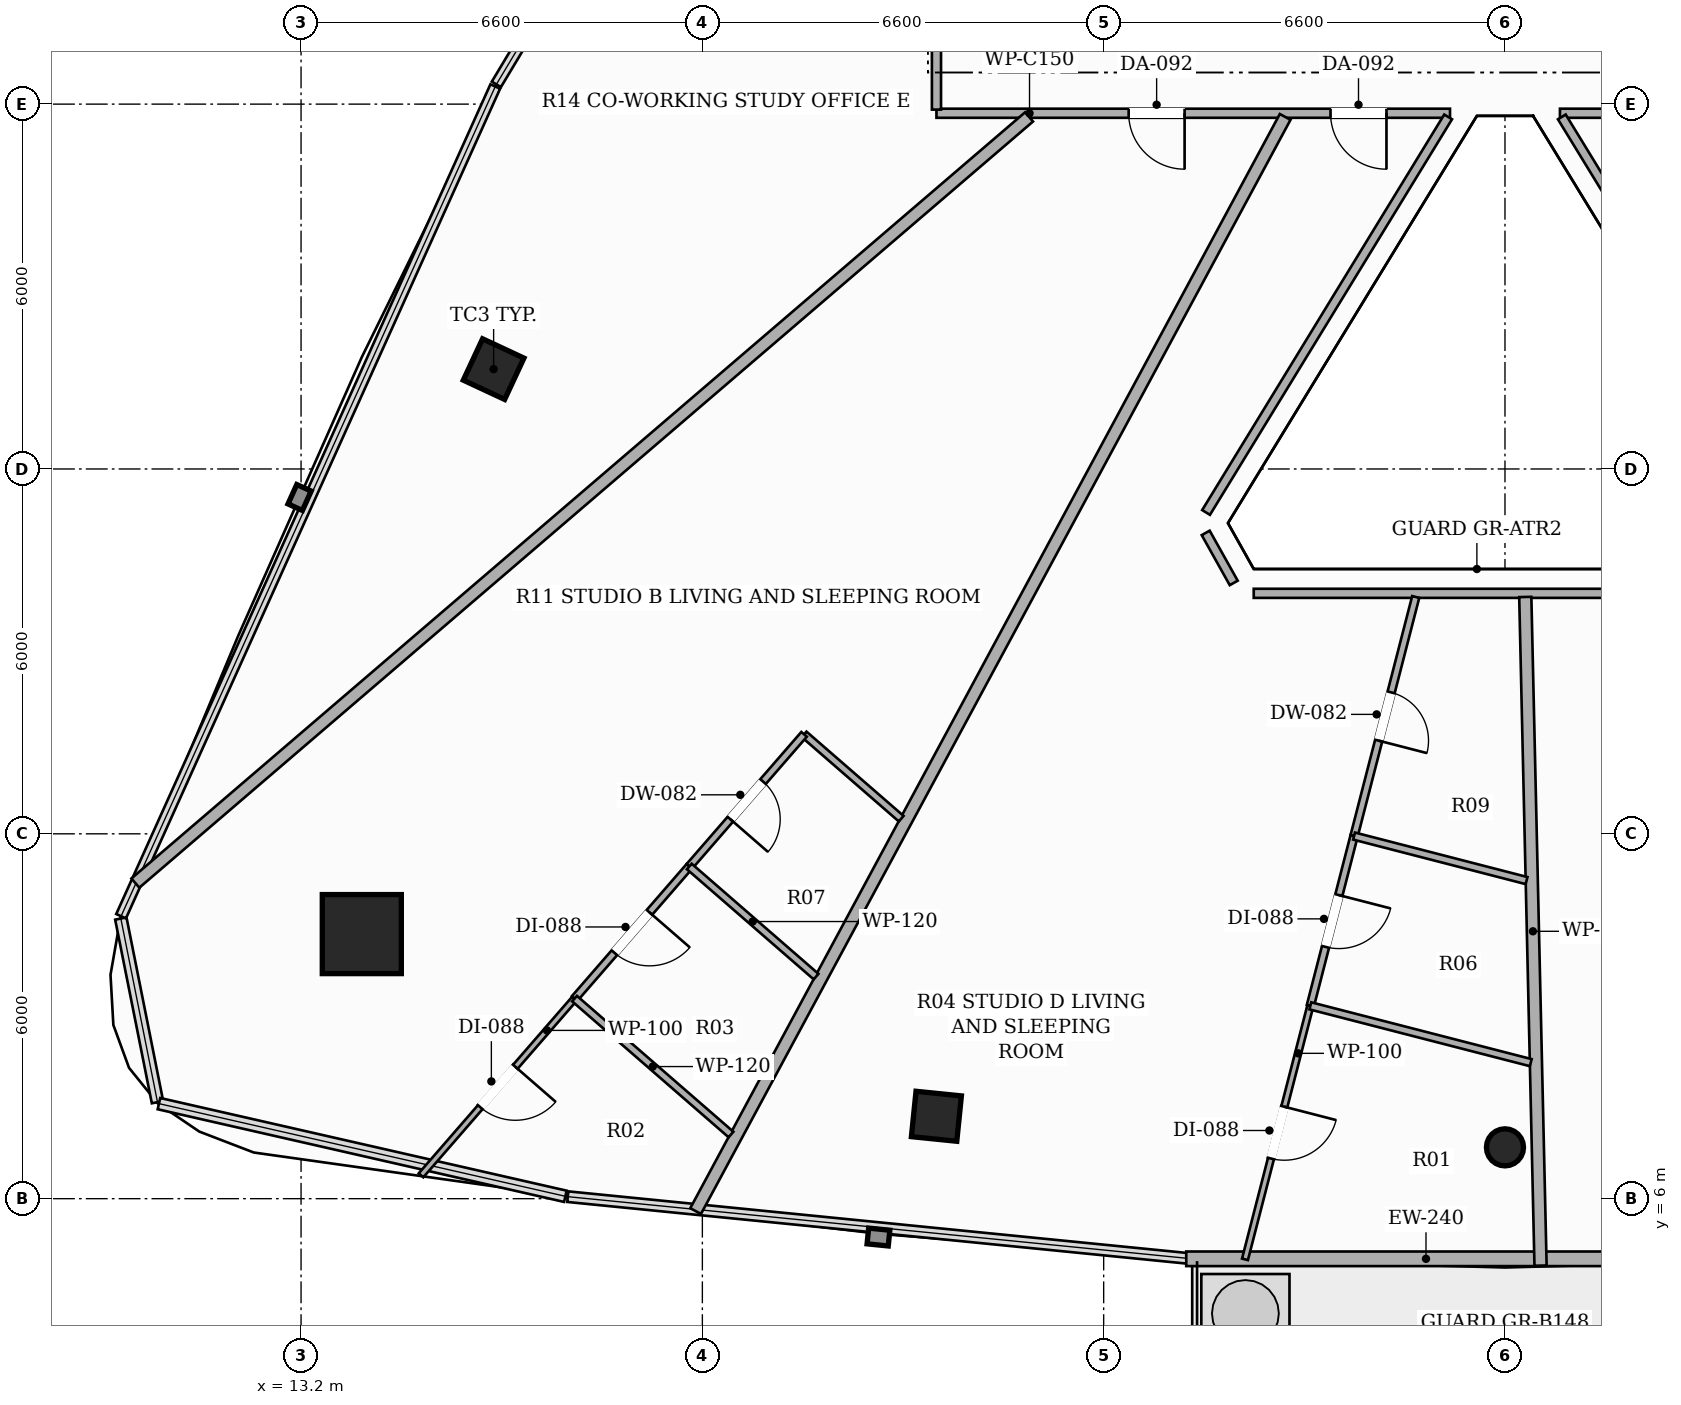
"""IFC4 building model, lengths in metres.
Left out: names, types, materials, properties, quantities, classifications, styles, units other than length and angle.
Written with IfcOpenShell. Run it as: python <this file> out.ifc"""

import sys

from ifc_helpers import new_model, si_unit, direction, frame, frame_2d, origin, origin_2d, place, context, subcontext, project, spatial, rectangle, hollow_rectangle, hollow_circle, extrude, element, fill, save


model = new_model("IFC4")
c1 = context("Model", 3, precision=1e-05, world=origin(), true_north=direction((0.0, 1.0)))
c2 = subcontext(c1, "Body", "Model", "MODEL_VIEW")
j1 = project(units=[si_unit("LENGTHUNIT", "METRE"), si_unit("PLANEANGLEUNIT", "RADIAN")], contexts=[c1])
p1 = place(None, origin())
s1 = spatial("IfcSite", under=j1, at=p1, CompositionType="ELEMENT")
p2 = place(p1, origin())
s2 = spatial("IfcBuilding", under=s1, at=p2, CompositionType="ELEMENT")
p3 = place(p2, frame((0.0, 0.0, 232.7)))
s3 = spatial("IfcBuildingStorey", under=s2, at=p3, CompositionType="ELEMENT", Elevation=232.7)
p4 = place(p3, frame((14.199, 10.351, 0.0), z_axis=(0.0, 0.0, 1.0), x_axis=(1.0, 0.0, 0.0)))
e1 = element("IfcColumn", 1, at=p4, inside=s3, PredefinedType="COLUMN", context=c2, shape_type="SweptSolid", body=[
    extrude(hollow_rectangle(XDim=1.3, YDim=1.3, WallThickness=0.04, at=origin_2d()), origin(), (0.0, 0.0, 1.0), 3.3),
])
for number, where, z_axis, x_axis in (
    (2, (16.367, 19.642, 0.0), (0.0, 0.0, 1.0), (0.423, 0.906, 0.0)),
    (3, (23.649, 7.355, 0.0), (0.0, 0.0, 1.0), (-0.995, 0.101, 0.0)),
):
    element("IfcColumn", number, at=place(p3, frame(where, z_axis=z_axis, x_axis=x_axis)), inside=s3, PredefinedType="COLUMN", context=c2, shape_type="SweptSolid", body=[
        extrude(hollow_rectangle(XDim=0.75, YDim=0.75, WallThickness=0.025, at=origin_2d()), origin(), (0.0, 0.0, 1.0), 3.3),
    ])
p5 = place(p3, frame((33.0, 6.844, 0.0), z_axis=(0.0, 0.0, 1.0), x_axis=(1.0, 0.0, 0.0)))
e4 = element("IfcColumn", 4, at=p5, inside=s3, PredefinedType="COLUMN", context=c2, shape_type="SweptSolid", body=[
    extrude(hollow_circle(Radius=0.305, WallThickness=0.016, at=origin_2d()), origin(), (0.0, 0.0, 1.0), 3.3),
])
p6 = place(p3, frame((27.758, 5.011, 0.0), z_axis=(0.0, 0.0, 1.0), x_axis=(1.0, 0.0, 0.0)))
e5 = element("IfcWall", 5, at=p6, inside=s3, PredefinedType="SOLIDWALL", context=c2, shape_type="SweptSolid", body=[
    extrude(rectangle(XDim=10.484, YDim=0.24, at=frame_2d((5.242, 0.0))), origin(), (0.0, 0.0, 1.0), 2.584),
])
p7 = place(p6, frame((7.986, 0.0, 0.0)))
e6 = element("IfcOpeningElement", 6, at=p7, cuts=e5, PredefinedType="OPENING", context=c2, shape_type="SweptSolid", body=[
    extrude(rectangle(XDim=1.8, YDim=2.2, at=frame_2d((0.9, 1.1))), frame((0.0, 0.13, 0.0), z_axis=(0.0, -1.0, 0.0), x_axis=(1.0, 0.0, 0.0)), (0.0, 0.0, 1.0), 0.26),
])
p8 = place(p3, frame((32.096, 23.85, 0.0), z_axis=(0.0, 0.0, 1.0), x_axis=(-1.0, 0.0, 0.0)))
e7 = element("IfcWall", 7, at=p8, inside=s3, PredefinedType="PARTITIONING", context=c2, shape_type="SweptSolid", body=[
    extrude(rectangle(XDim=8.446, YDim=0.15, at=frame_2d((4.223, 0.0))), origin(), (0.0, 0.0, 1.0), 2.525),
])
p9 = place(p8, frame((4.365, 0.0, 0.0)))
e8 = element("IfcOpeningElement", 8, at=p9, cuts=e7, PredefinedType="OPENING", context=c2, shape_type="SweptSolid", body=[
    extrude(rectangle(XDim=0.92, YDim=2.15, at=frame_2d((0.46, 1.075))), frame((0.0, 0.085, 0.0), z_axis=(0.0, -1.0, 0.0), x_axis=(1.0, 0.0, 0.0)), (0.0, 0.0, 1.0), 0.17),
])
p10 = place(p8, frame((1.045, 0.0, 0.0)))
e9 = element("IfcOpeningElement", 9, at=p10, cuts=e7, PredefinedType="OPENING", context=c2, shape_type="SweptSolid", body=[
    extrude(rectangle(XDim=0.92, YDim=2.15, at=frame_2d((0.46, 1.075))), frame((0.0, 0.085, 0.0), z_axis=(0.0, -1.0, 0.0), x_axis=(1.0, 0.0, 0.0)), (0.0, 0.0, 1.0), 0.17),
])
p11 = place(p3, frame((23.65, 23.91, 0.0), z_axis=(0.0, 0.0, 1.0), x_axis=(0.0, 1.0, 0.0)))
e10 = element("IfcWall", 10, at=p11, inside=s3, PredefinedType="PARTITIONING", context=c2, shape_type="SweptSolid", body=[
    extrude(rectangle(XDim=11.888, YDim=0.15, at=frame_2d((5.944, 0.0))), origin(), (0.0, 0.0, 1.0), 2.452),
])
p12 = place(p11, frame((5.504, 0.0, 0.0)))
e11 = element("IfcOpeningElement", 11, at=p12, cuts=e10, PredefinedType="OPENING", context=c2, shape_type="SweptSolid", body=[
    extrude(rectangle(XDim=0.88, YDim=2.1, at=frame_2d((0.44, 1.05))), frame((0.0, 0.085, 0.0), z_axis=(0.0, -1.0, 0.0), x_axis=(1.0, 0.0, 0.0)), (0.0, 0.0, 1.0), 0.17),
])
p13 = place(p3, frame((42.19, 23.85, 0.0), z_axis=(0.0, 0.0, 1.0), x_axis=(-1.0, 0.0, 0.0)))
e12 = element("IfcWall", 12, at=p13, inside=s3, PredefinedType="PARTITIONING", context=c2, shape_type="SweptSolid", body=[
    extrude(rectangle(XDim=8.286, YDim=0.15, at=frame_2d((4.143, 0.0))), origin(), (0.0, 0.0, 1.0), 2.525),
])
p14 = place(p13, frame((5.824, 0.0, 0.0)))
e13 = element("IfcOpeningElement", 13, at=p14, cuts=e12, PredefinedType="OPENING", context=c2, shape_type="SweptSolid", body=[
    extrude(rectangle(XDim=0.88, YDim=2.1, at=frame_2d((0.44, 1.05))), frame((0.0, 0.085, 0.0), z_axis=(0.0, -1.0, 0.0), x_axis=(1.0, 0.0, 0.0)), (0.0, 0.0, 1.0), 0.17),
])
p15 = place(p13, frame((2.745, 0.0, 0.0)))
e14 = element("IfcOpeningElement", 14, at=p15, cuts=e12, PredefinedType="OPENING", context=c2, shape_type="SweptSolid", body=[
    extrude(rectangle(XDim=0.88, YDim=2.1, at=frame_2d((0.44, 1.05))), frame((0.0, 0.085, 0.0), z_axis=(0.0, -1.0, 0.0), x_axis=(1.0, 0.0, 0.0)), (0.0, 0.0, 1.0), 0.17),
])
p16 = place(p3, frame((33.935, 23.79, 0.0), z_axis=(0.0, 0.0, 1.0), x_axis=(0.521984684225, -0.852954857794, 0.0)))
e15 = element("IfcWall", 15, at=p16, inside=s3, PredefinedType="PARTITIONING", context=c2, shape_type="SweptSolid", body=[
    extrude(rectangle(XDim=7.626, YDim=0.15, at=frame_2d((3.813, 0.0))), origin(), (0.0, 0.0, 1.0), 2.733),
])
p17 = place(p3, frame((37.132, 15.955, 0.0), z_axis=(0.0, 0.0, 1.0), x_axis=(-1.0, 0.0, 0.0)))
e16 = element("IfcWall", 16, at=p17, inside=s3, PredefinedType="PARTITIONING", context=c2, shape_type="SweptSolid", body=[
    extrude(rectangle(XDim=8.264, YDim=0.15, at=frame_2d((4.132, 0.0))), origin(), (0.0, 0.0, 1.0), 2.733),
])
p18 = place(p3, frame((28.539, 16.126, 0.0), z_axis=(0.0, 0.0, 1.0), x_axis=(-0.488847636641, 0.87236918111, 0.0)))
e17 = element("IfcWall", 17, at=p18, inside=s3, PredefinedType="PARTITIONING", context=c2, shape_type="SweptSolid", body=[
    extrude(rectangle(XDim=0.943, YDim=0.15, at=frame_2d((0.472, 0.0))), origin(), (0.0, 0.0, 1.0), 3.02),
])
p19 = place(p3, frame((28.084, 17.285, 0.0), z_axis=(0.0, 0.0, 1.0), x_axis=(0.521984684225, 0.852954857794, 0.0)))
e18 = element("IfcWall", 18, at=p19, inside=s3, PredefinedType="PARTITIONING", context=c2, shape_type="SweptSolid", body=[
    extrude(rectangle(XDim=7.626, YDim=0.15, at=frame_2d((3.813, 0.0))), origin(), (0.0, 0.0, 1.0), 2.733),
])
p20 = place(p3, frame((33.585, 4.899, 0.0), z_axis=(0.0, 0.0, 1.0), x_axis=(-0.022818213595, 0.999739630668, 0.0)))
e19 = element("IfcWall", 19, at=p20, inside=s3, PredefinedType="PARTITIONING", context=c2, shape_type="SweptSolid", body=[
    extrude(rectangle(XDim=10.999, YDim=0.2, at=frame_2d((5.5, 0.0))), origin(), (0.0, 0.0, 1.0), 2.452),
])
p21 = place(p3, frame((29.385, 23.79, 0.0), z_axis=(0.0, 0.0, 1.0), x_axis=(-0.474361203305, -0.880330306646, 0.0)))
e20 = element("IfcWall", 20, at=p21, inside=s3, PredefinedType="PARTITIONING", context=c2, shape_type="SweptSolid", body=[
    extrude(rectangle(XDim=20.44, YDim=0.2, at=frame_2d((10.22, 0.0))), origin(), (0.0, 0.0, 1.0), 2.452),
])
p22 = place(p3, frame((10.475, 11.19, 0.0), z_axis=(0.0, 0.0, 1.0), x_axis=(0.759210311249, 0.650845375871, 0.0)))
e21 = element("IfcWall", 21, at=p22, inside=s3, PredefinedType="PARTITIONING", context=c2, shape_type="SweptSolid", body=[
    extrude(rectangle(XDim=19.36, YDim=0.2, at=frame_2d((9.68, 0.0))), origin(), (0.0, 0.0, 1.0), 2.452),
])
p23 = place(p3, frame((23.07, 12.249, 0.0), z_axis=(0.0, 0.0, 1.0), x_axis=(-0.75504514731, 0.655672803709, 0.0)))
e22 = element("IfcWall", 22, at=p23, inside=s3, PredefinedType="PARTITIONING", context=c2, shape_type="SweptSolid", body=[
    extrude(rectangle(XDim=2.115, YDim=0.12, at=frame_2d((1.058, 0.0))), origin(), (0.0, 0.0, 1.0), 2.733),
])
p24 = place(p3, frame((21.473, 13.636, 0.0), z_axis=(0.0, 0.0, 1.0), x_axis=(-0.655840593364, -0.754899407932, 0.0)))
e23 = element("IfcWall", 23, at=p24, inside=s3, PredefinedType="PARTITIONING", context=c2, shape_type="SweptSolid", body=[
    extrude(rectangle(XDim=2.879, YDim=0.12, at=frame_2d((1.439, 0.0))), origin(), (0.0, 0.0, 1.0), 2.733),
])
p25 = place(p24, frame((1.029, 0.0, 0.0)))
e24 = element("IfcOpeningElement", 24, at=p25, cuts=e23, PredefinedType="OPENING", context=c2, shape_type="SweptSolid", body=[
    extrude(rectangle(XDim=0.82, YDim=2.1, at=frame_2d((0.41, 1.05))), frame((0.0, 0.07, 0.0), z_axis=(0.0, -1.0, 0.0), x_axis=(1.0, 0.0, 0.0)), (0.0, 0.0, 1.0), 0.14),
])
p26 = place(p3, frame((19.585, 11.463, 0.0), z_axis=(0.0, 0.0, 1.0), x_axis=(-0.655689200825, -0.755030907924, 0.0)))
e25 = element("IfcWall", 25, at=p26, inside=s3, PredefinedType="PARTITIONING", context=c2, shape_type="SweptSolid", body=[
    extrude(rectangle(XDim=2.878, YDim=0.12, at=frame_2d((1.439, 0.0))), origin(), (0.0, 0.0, 1.0), 2.452),
])
p27 = place(p26, frame((0.999, 0.0, 0.0)))
e26 = element("IfcOpeningElement", 26, at=p27, cuts=e25, PredefinedType="OPENING", context=c2, shape_type="SweptSolid", body=[
    extrude(rectangle(XDim=0.88, YDim=2.1, at=frame_2d((0.44, 1.05))), frame((0.0, 0.07, 0.0), z_axis=(0.0, -1.0, 0.0), x_axis=(1.0, 0.0, 0.0)), (0.0, 0.0, 1.0), 0.14),
])
p28 = place(p3, frame((17.698, 9.29, 0.0), z_axis=(0.0, 0.0, 1.0), x_axis=(-0.655874061554, -0.754870330176, 0.0)))
e27 = element("IfcWall", 27, at=p28, inside=s3, PredefinedType="PARTITIONING", context=c2, shape_type="SweptSolid", body=[
    extrude(rectangle(XDim=3.85, YDim=0.1, at=frame_2d((1.925, 0.0))), origin(), (0.0, 0.0, 1.0), 2.452),
])
p29 = place(p28, frame((1.485, 0.0, 0.0)))
e28 = element("IfcOpeningElement", 28, at=p29, cuts=e27, PredefinedType="OPENING", context=c2, shape_type="SweptSolid", body=[
    extrude(rectangle(XDim=0.88, YDim=2.1, at=frame_2d((0.44, 1.05))), frame((0.0, 0.06, 0.0), z_axis=(0.0, -1.0, 0.0), x_axis=(1.0, 0.0, 0.0)), (0.0, 0.0, 1.0), 0.12),
])
p30 = place(p3, frame((21.67, 9.652, 0.0), z_axis=(0.0, 0.0, 1.0), x_axis=(-0.755003171317, 0.655721138367, 0.0)))
e29 = element("IfcWall", 29, at=p30, inside=s3, PredefinedType="PARTITIONING", context=c2, shape_type="SweptSolid", body=[
    extrude(rectangle(XDim=2.761, YDim=0.12, at=frame_2d((1.381, 0.0))), origin(), (0.0, 0.0, 1.0), 2.733),
])
p31 = place(p3, frame((20.271, 7.055, 0.0), z_axis=(0.0, 0.0, 1.0), x_axis=(-0.754936987289, 0.65579733548, 0.0)))
e30 = element("IfcWall", 30, at=p31, inside=s3, PredefinedType="PARTITIONING", context=c2, shape_type="SweptSolid", body=[
    extrude(rectangle(XDim=3.408, YDim=0.12, at=frame_2d((1.704, 0.0))), origin(), (0.0, 0.0, 1.0), 2.452),
])
p32 = place(p3, frame((31.532, 15.895, 0.0), z_axis=(0.0, 0.0, 1.0), x_axis=(-0.24968708983, -0.968326575682, 0.0)))
e31 = element("IfcWall", 31, at=p32, inside=s3, PredefinedType="PARTITIONING", context=c2, shape_type="SweptSolid", body=[
    extrude(rectangle(XDim=4.061, YDim=0.12, at=frame_2d((2.03, 0.0))), origin(), (0.0, 0.0, 1.0), 3.02),
])
p33 = place(p32, frame((1.62, 0.0, 0.0)))
e32 = element("IfcOpeningElement", 32, at=p33, cuts=e31, PredefinedType="OPENING", context=c2, shape_type="SweptSolid", body=[
    extrude(rectangle(XDim=0.82, YDim=2.1, at=frame_2d((0.41, 1.05))), frame((0.0, 0.07, 0.0), z_axis=(0.0, -1.0, 0.0), x_axis=(1.0, 0.0, 0.0)), (0.0, 0.0, 1.0), 0.14),
])
p34 = place(p3, frame((30.518, 11.963, 0.0), z_axis=(0.0, 0.0, 1.0), x_axis=(-0.249383700926, -0.968404755106, 0.0)))
e33 = element("IfcWall", 33, at=p34, inside=s3, PredefinedType="PARTITIONING", context=c2, shape_type="SweptSolid", body=[
    extrude(rectangle(XDim=2.883, YDim=0.12, at=frame_2d((1.441, 0.0))), origin(), (0.0, 0.0, 1.0), 3.02),
])
p35 = place(p34, frame((1.002, 0.0, 0.0)))
e34 = element("IfcOpeningElement", 34, at=p35, cuts=e33, PredefinedType="OPENING", context=c2, shape_type="SweptSolid", body=[
    extrude(rectangle(XDim=0.88, YDim=2.1, at=frame_2d((0.44, 1.05))), frame((0.0, 0.07, 0.0), z_axis=(0.0, -1.0, 0.0), x_axis=(1.0, 0.0, 0.0)), (0.0, 0.0, 1.0), 0.14),
])
p36 = place(p3, frame((29.799, 9.171, 0.0), z_axis=(0.0, 0.0, 1.0), x_axis=(-0.249680784234, -0.968328201585, 0.0)))
e35 = element("IfcWall", 35, at=p36, inside=s3, PredefinedType="PARTITIONING", context=c2, shape_type="SweptSolid", body=[
    extrude(rectangle(XDim=4.305, YDim=0.1, at=frame_2d((2.153, 0.0))), origin(), (0.0, 0.0, 1.0), 2.452),
])
p37 = place(p36, frame((1.713, 0.0, 0.0)))
e36 = element("IfcOpeningElement", 36, at=p37, cuts=e35, PredefinedType="OPENING", context=c2, shape_type="SweptSolid", body=[
    extrude(rectangle(XDim=0.88, YDim=2.1, at=frame_2d((0.44, 1.05))), frame((0.0, 0.06, 0.0), z_axis=(0.0, -1.0, 0.0), x_axis=(1.0, 0.0, 0.0)), (0.0, 0.0, 1.0), 0.12),
])
p38 = place(p3, frame((33.355, 11.231, 0.0), z_axis=(0.0, 0.0, 1.0), x_axis=(-0.968291630449, 0.249822573846, 0.0)))
e37 = element("IfcWall", 37, at=p38, inside=s3, PredefinedType="PARTITIONING", context=c2, shape_type="SweptSolid", body=[
    extrude(rectangle(XDim=2.93, YDim=0.12, at=frame_2d((1.465, 0.0))), origin(), (0.0, 0.0, 1.0), 2.733),
])
p39 = place(p3, frame((33.424, 8.237, 0.0), z_axis=(0.0, 0.0, 1.0), x_axis=(-0.968383623763, 0.249465743595, 0.0)))
e38 = element("IfcWall", 38, at=p39, inside=s3, PredefinedType="PARTITIONING", context=c2, shape_type="SweptSolid", body=[
    extrude(rectangle(XDim=3.743, YDim=0.12, at=frame_2d((1.872, 0.0))), origin(), (0.0, 0.0, 1.0), 2.733),
])
p40 = place(p9, origin())
e39 = element("IfcDoor", 39, at=p40, inside=s3, OperationType="SINGLE_SWING_LEFT", PredefinedType="DOOR", context=c2, shape_type="SweptSolid", body=[
    extrude(rectangle(XDim=0.92, YDim=2.15, at=frame_2d((0.46, 1.075))), frame((0.0, 0.025, 0.0), z_axis=(0.0, -1.0, 0.0), x_axis=(1.0, 0.0, 0.0)), (0.0, 0.0, 1.0), 0.05),
])
fill(e8, e39)
p41 = place(p25, origin())
e40 = element("IfcDoor", 40, at=p41, inside=s3, OperationType="SINGLE_SWING_RIGHT", PredefinedType="DOOR", context=c2, shape_type="SweptSolid", body=[
    extrude(rectangle(XDim=0.82, YDim=2.1, at=frame_2d((0.41, 1.05))), frame((0.0, 0.025, 0.0), z_axis=(0.0, -1.0, 0.0), x_axis=(1.0, 0.0, 0.0)), (0.0, 0.0, 1.0), 0.05),
])
fill(e24, e40)
p42 = place(p27, origin())
e41 = element("IfcDoor", 41, at=p42, inside=s3, OperationType="SINGLE_SWING_LEFT", PredefinedType="DOOR", context=c2, shape_type="SweptSolid", body=[
    extrude(rectangle(XDim=0.88, YDim=2.1, at=frame_2d((0.44, 1.05))), frame((0.0, 0.025, 0.0), z_axis=(0.0, -1.0, 0.0), x_axis=(1.0, 0.0, 0.0)), (0.0, 0.0, 1.0), 0.05),
])
fill(e26, e41)
p43 = place(p29, origin())
e42 = element("IfcDoor", 42, at=p43, inside=s3, OperationType="SINGLE_SWING_LEFT", PredefinedType="DOOR", context=c2, shape_type="SweptSolid", body=[
    extrude(rectangle(XDim=0.88, YDim=2.1, at=frame_2d((0.44, 1.05))), frame((0.0, 0.025, 0.0), z_axis=(0.0, -1.0, 0.0), x_axis=(1.0, 0.0, 0.0)), (0.0, 0.0, 1.0), 0.05),
])
fill(e28, e42)
p44 = place(p10, origin())
e43 = element("IfcDoor", 43, at=p44, inside=s3, OperationType="SINGLE_SWING_LEFT", PredefinedType="DOOR", context=c2, shape_type="SweptSolid", body=[
    extrude(rectangle(XDim=0.92, YDim=2.15, at=frame_2d((0.46, 1.075))), frame((0.0, 0.025, 0.0), z_axis=(0.0, -1.0, 0.0), x_axis=(1.0, 0.0, 0.0)), (0.0, 0.0, 1.0), 0.05),
])
fill(e9, e43)
p45 = place(p33, origin())
e44 = element("IfcDoor", 44, at=p45, inside=s3, OperationType="SINGLE_SWING_RIGHT", PredefinedType="DOOR", context=c2, shape_type="SweptSolid", body=[
    extrude(rectangle(XDim=0.82, YDim=2.1, at=frame_2d((0.41, 1.05))), frame((0.0, 0.025, 0.0), z_axis=(0.0, -1.0, 0.0), x_axis=(1.0, 0.0, 0.0)), (0.0, 0.0, 1.0), 0.05),
])
fill(e32, e44)
p46 = place(p35, origin())
e45 = element("IfcDoor", 45, at=p46, inside=s3, OperationType="SINGLE_SWING_LEFT", PredefinedType="DOOR", context=c2, shape_type="SweptSolid", body=[
    extrude(rectangle(XDim=0.88, YDim=2.1, at=frame_2d((0.44, 1.05))), frame((0.0, 0.025, 0.0), z_axis=(0.0, -1.0, 0.0), x_axis=(1.0, 0.0, 0.0)), (0.0, 0.0, 1.0), 0.05),
])
fill(e34, e45)
p47 = place(p37, origin())
e46 = element("IfcDoor", 46, at=p47, inside=s3, OperationType="SINGLE_SWING_LEFT", PredefinedType="DOOR", context=c2, shape_type="SweptSolid", body=[
    extrude(rectangle(XDim=0.88, YDim=2.1, at=frame_2d((0.44, 1.05))), frame((0.0, 0.025, 0.0), z_axis=(0.0, -1.0, 0.0), x_axis=(1.0, 0.0, 0.0)), (0.0, 0.0, 1.0), 0.05),
])
fill(e36, e46)
save(model, sys.argv[1])
